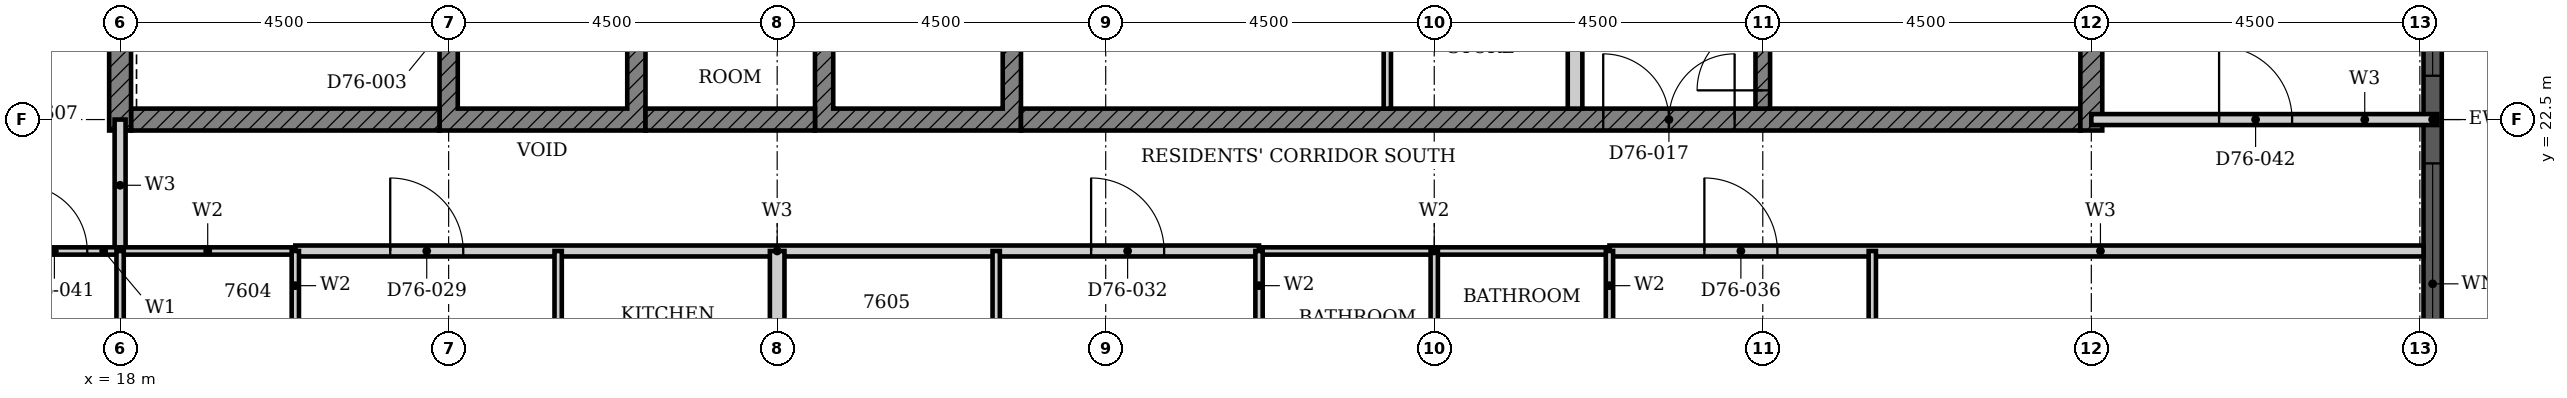
"""IFC4 building model, lengths in metres.
Left out: names, types, materials, properties, quantities, classifications, styles, units other than length and angle.
Written with IfcOpenShell. Run it as: python <this file> out.ifc"""

import sys

from ifc_helpers import new_model, si_unit, direction, frame, frame_2d, origin, place, context, subcontext, project, spatial, polyline, rectangle, outline, extrude, element, fill, save


model = new_model("IFC4")
c1 = context("Model", 3, precision=1e-05, world=origin(), true_north=direction((0.0, 1.0)))
c2 = subcontext(c1, "Body", "Model", "MODEL_VIEW")
j1 = project(units=[si_unit("LENGTHUNIT", "METRE"), si_unit("PLANEANGLEUNIT", "RADIAN")], contexts=[c1])
p1 = place(None, origin())
s1 = spatial("IfcSite", under=j1, at=p1, CompositionType="ELEMENT")
p2 = place(p1, origin())
s2 = spatial("IfcBuilding", under=s1, at=p2, CompositionType="ELEMENT")
p3 = place(p2, frame((0.0, 0.0, 298.2)))
s3 = spatial("IfcBuildingStorey", under=s2, at=p3, CompositionType="ELEMENT", Elevation=298.2)
p4 = place(p3, frame((49.675, 18.3, 0.0), z_axis=(0.0, 0.0, 1.0), x_axis=(0.0, 1.0, 0.0)))
e1 = element("IfcWall", 1, at=p4, inside=s3, PredefinedType="SOLIDWALL", context=c2, shape_type="SweptSolid", body=[
    extrude(rectangle(XDim=8.4, YDim=0.25, at=frame_2d((4.2, 0.0))), origin(), (0.0, 0.0, 1.0), 3.7),
])
p5 = place(p4, frame((0.3, 0.0, 0.45)))
e2 = element("IfcOpeningElement", 2, at=p5, cuts=e1, PredefinedType="OPENING", context=c2, shape_type="SweptSolid", body=[
    extrude(rectangle(XDim=3.3, YDim=2.3, at=frame_2d((1.65, 1.15))), frame((0.0, 0.135, 0.0), z_axis=(0.0, -1.0, 0.0), x_axis=(1.0, 0.0, 0.0)), (0.0, 0.0, 1.0), 0.27),
])
p6 = place(p4, frame((4.8, 0.0, 0.45)))
e3 = element("IfcOpeningElement", 3, at=p6, cuts=e1, PredefinedType="OPENING", context=c2, shape_type="SweptSolid", body=[
    extrude(rectangle(XDim=3.3, YDim=2.3, at=frame_2d((1.65, 1.15))), frame((0.0, 0.135, 0.0), z_axis=(0.0, -1.0, 0.0), x_axis=(1.0, 0.0, 0.0)), (0.0, 0.0, 1.0), 0.27),
])
p7 = place(p3, origin())
e4 = element("IfcWall", 4, at=p7, inside=s3, PredefinedType="SHEAR", context=c2, shape_type="SweptSolid", body=[
    extrude(outline(polyline([(22.375, 22.35), (25.197, 22.35), (25.197, 25.275), (24.947, 25.275), (24.947, 22.65), (22.625, 22.65), (22.625, 25.275), (22.375, 25.275), (22.375, 22.35)])), origin(), (0.0, 0.0, 1.0), 3.4),
])
p8 = place(p3, origin())
e5 = element("IfcWall", 5, at=p8, inside=s3, PredefinedType="SHEAR", context=c2, shape_type="SweptSolid", body=[
    extrude(outline(polyline([(27.518, 22.35), (30.339, 22.35), (30.339, 25.275), (30.089, 25.275), (30.089, 22.65), (27.768, 22.65), (27.768, 25.275), (27.518, 25.275), (27.518, 22.35)])), origin(), (0.0, 0.0, 1.0), 3.4),
])
p9 = place(p3, frame((18.15, 22.5, 0.0), z_axis=(0.0, 0.0, 1.0), x_axis=(1.0, 0.0, 0.0)))
e6 = element("IfcWall", 6, at=p9, inside=s3, PredefinedType="SHEAR", context=c2, shape_type="SweptSolid", body=[
    extrude(rectangle(XDim=4.225, YDim=0.3, at=frame_2d((2.113, 0.0))), origin(), (0.0, 0.0, 1.0), 3.4),
])
p10 = place(p3, frame((25.197, 22.5, 0.0), z_axis=(0.0, 0.0, 1.0), x_axis=(1.0, 0.0, 0.0)))
e7 = element("IfcWall", 7, at=p10, inside=s3, PredefinedType="SHEAR", context=c2, shape_type="SweptSolid", body=[
    extrude(rectangle(XDim=2.321, YDim=0.3, at=frame_2d((1.161, 0.0))), origin(), (0.0, 0.0, 1.0), 3.4),
])
p11 = place(p3, frame((30.339, 22.5, 0.0), z_axis=(0.0, 0.0, 1.0), x_axis=(1.0, 0.0, 0.0)))
e8 = element("IfcWall", 8, at=p11, inside=s3, PredefinedType="SHEAR", context=c2, shape_type="SweptSolid", body=[
    extrude(rectangle(XDim=14.511, YDim=0.3, at=frame_2d((7.255, 0.0))), origin(), (0.0, 0.0, 1.0), 3.4),
])
p12 = place(p11, frame((7.975, 0.0, 0.0)))
e9 = element("IfcOpeningElement", 9, at=p12, cuts=e8, PredefinedType="OPENING", context=c2, shape_type="SweptSolid", body=[
    extrude(rectangle(XDim=1.8, YDim=2.1, at=frame_2d((0.9, 1.05))), frame((0.0, 0.16, 0.0), z_axis=(0.0, -1.0, 0.0), x_axis=(1.0, 0.0, 0.0)), (0.0, 0.0, 1.0), 0.32),
])
for number, where, z_axis, x_axis in (
    (10, (18.0, 22.35, 0.0), (0.0, 0.0, 1.0), (0.0, 1.0, 0.0)),
    (11, (45.0, 22.35, 0.0), (0.0, 0.0, 1.0), (0.0, 1.0, 0.0)),
):
    element("IfcWall", number, at=place(p3, frame(where, z_axis=z_axis, x_axis=x_axis)), inside=s3, PredefinedType="SHEAR", context=c2, shape_type="SweptSolid", body=[
        extrude(rectangle(XDim=9.3, YDim=0.3, at=frame_2d((4.65, 0.0))), origin(), (0.0, 0.0, 1.0), 3.4),
    ])
p13 = place(p3, frame((37.928, 22.65, 0.0), z_axis=(0.0, 0.0, 1.0), x_axis=(0.0, 1.0, 0.0)))
e12 = element("IfcWall", 12, at=p13, inside=s3, PredefinedType="PARTITIONING", context=c2, shape_type="SweptSolid", body=[
    extrude(rectangle(XDim=2.625, YDim=0.2, at=frame_2d((1.312, 0.0))), origin(), (0.0, 0.0, 1.0), 3.4),
])
p14 = place(p3, frame((35.357, 22.65, 0.0), z_axis=(0.0, 0.0, 1.0), x_axis=(0.0, 1.0, 0.0)))
e13 = element("IfcWall", 13, at=p14, inside=s3, PredefinedType="PARTITIONING", context=c2, shape_type="SweptSolid", body=[
    extrude(rectangle(XDim=2.625, YDim=0.1, at=frame_2d((1.312, 0.0))), origin(), (0.0, 0.0, 1.0), 3.4),
])
p15 = place(p3, frame((40.5, 22.65, 0.0), z_axis=(0.0, 0.0, 1.0), x_axis=(0.0, 1.0, 0.0)))
e14 = element("IfcWall", 14, at=p15, inside=s3, PredefinedType="SHEAR", context=c2, shape_type="SweptSolid", body=[
    extrude(rectangle(XDim=5.825, YDim=0.2, at=frame_2d((2.913, 0.0))), origin(), (0.0, 0.0, 1.0), 3.4),
])
p16 = place(p15, frame((0.25, 0.0, 0.0)))
e15 = element("IfcOpeningElement", 15, at=p16, cuts=e14, PredefinedType="OPENING", context=c2, shape_type="SweptSolid", body=[
    extrude(rectangle(XDim=1.8, YDim=2.1, at=frame_2d((0.9, 1.05))), frame((0.0, 0.11, 0.0), z_axis=(0.0, -1.0, 0.0), x_axis=(1.0, 0.0, 0.0)), (0.0, 0.0, 1.0), 0.22),
])
p17 = place(p3, frame((20.4, 20.7, 0.0), z_axis=(0.0, 0.0, 1.0), x_axis=(1.0, 0.0, 0.0)))
e16 = element("IfcWall", 16, at=p17, inside=s3, PredefinedType="PARTITIONING", context=c2, shape_type="SweptSolid", body=[
    extrude(rectangle(XDim=13.2, YDim=0.15, at=frame_2d((6.6, 0.0))), origin(), (0.0, 0.0, 1.0), 3.4),
])
p18 = place(p17, frame((1.3, 0.0, 0.0)))
e17 = element("IfcOpeningElement", 17, at=p18, cuts=e16, PredefinedType="OPENING", context=c2, shape_type="SweptSolid", body=[
    extrude(rectangle(XDim=1.0, YDim=2.2, at=frame_2d((0.5, 1.1))), frame((0.0, 0.085, 0.0), z_axis=(0.0, -1.0, 0.0), x_axis=(1.0, 0.0, 0.0)), (0.0, 0.0, 1.0), 0.17),
])
p19 = place(p17, frame((10.9, 0.0, 0.0)))
e18 = element("IfcOpeningElement", 18, at=p19, cuts=e16, PredefinedType="OPENING", context=c2, shape_type="SweptSolid", body=[
    extrude(rectangle(XDim=1.0, YDim=2.2, at=frame_2d((0.5, 1.1))), frame((0.0, 0.085, 0.0), z_axis=(0.0, -1.0, 0.0), x_axis=(1.0, 0.0, 0.0)), (0.0, 0.0, 1.0), 0.17),
])
p20 = place(p3, frame((38.4, 20.7, 0.0), z_axis=(0.0, 0.0, 1.0), x_axis=(1.0, 0.0, 0.0)))
e19 = element("IfcWall", 19, at=p20, inside=s3, PredefinedType="PARTITIONING", context=c2, shape_type="SweptSolid", body=[
    extrude(rectangle(XDim=11.15, YDim=0.15, at=frame_2d((5.575, 0.0))), origin(), (0.0, 0.0, 1.0), 3.4),
])
p21 = place(p20, frame((1.3, 0.0, 0.0)))
e20 = element("IfcOpeningElement", 20, at=p21, cuts=e19, PredefinedType="OPENING", context=c2, shape_type="SweptSolid", body=[
    extrude(rectangle(XDim=1.0, YDim=2.2, at=frame_2d((0.5, 1.1))), frame((0.0, 0.085, 0.0), z_axis=(0.0, -1.0, 0.0), x_axis=(1.0, 0.0, 0.0)), (0.0, 0.0, 1.0), 0.17),
])
p22 = place(p3, frame((45.0, 22.5, 0.0), z_axis=(0.0, 0.0, 1.0), x_axis=(1.0, 0.0, 0.0)))
e21 = element("IfcWall", 21, at=p22, inside=s3, PredefinedType="PARTITIONING", context=c2, shape_type="SweptSolid", body=[
    extrude(rectangle(XDim=4.74, YDim=0.15, at=frame_2d((2.37, 0.0))), origin(), (0.0, 0.0, 1.0), 3.4),
])
p23 = place(p22, frame((1.75, 0.0, 0.0)))
e22 = element("IfcOpeningElement", 22, at=p23, cuts=e21, PredefinedType="OPENING", context=c2, shape_type="SweptSolid", body=[
    extrude(rectangle(XDim=1.0, YDim=2.2, at=frame_2d((0.5, 1.1))), frame((0.0, 0.085, 0.0), z_axis=(0.0, -1.0, 0.0), x_axis=(1.0, 0.0, 0.0)), (0.0, 0.0, 1.0), 0.17),
])
p24 = place(p3, frame((18.0, 20.7, 0.0), z_axis=(0.0, 0.0, 1.0), x_axis=(0.0, 1.0, 0.0)))
e23 = element("IfcWall", 23, at=p24, inside=s3, PredefinedType="PARTITIONING", context=c2, shape_type="SweptSolid", body=[
    extrude(rectangle(XDim=1.8, YDim=0.15, at=frame_2d((0.9, 0.0))), origin(), (0.0, 0.0, 1.0), 3.4),
])
p25 = place(p3, frame((16.2, 20.7, 0.0), z_axis=(0.0, 0.0, 1.0), x_axis=(1.0, 0.0, 0.0)))
e24 = element("IfcWall", 24, at=p25, inside=s3, PredefinedType="PARTITIONING", context=c2, shape_type="SweptSolid", body=[
    extrude(rectangle(XDim=1.8, YDim=0.1, at=frame_2d((0.9, 0.0))), origin(), (0.0, 0.0, 1.0), 3.4),
])
p26 = place(p25, frame((0.45, 0.0, 0.0)))
e25 = element("IfcOpeningElement", 25, at=p26, cuts=e24, PredefinedType="OPENING", context=c2, shape_type="SweptSolid", body=[
    extrude(rectangle(XDim=0.9, YDim=2.1, at=frame_2d((0.45, 1.05))), frame((0.0, 0.06, 0.0), z_axis=(0.0, -1.0, 0.0), x_axis=(1.0, 0.0, 0.0)), (0.0, 0.0, 1.0), 0.12),
])
for number, where, z_axis, x_axis in (
    (26, (24.0, 18.0, 0.0), (0.0, 0.0, 1.0), (0.0, 1.0, 0.0)),
    (27, (30.0, 18.0, 0.0), (0.0, 0.0, 1.0), (0.0, 1.0, 0.0)),
    (28, (42.0, 18.0, 0.0), (0.0, 0.0, 1.0), (0.0, 1.0, 0.0)),
):
    element("IfcWall", number, at=place(p3, frame(where, z_axis=z_axis, x_axis=x_axis)), inside=s3, PredefinedType="PARTITIONING", context=c2, shape_type="SweptSolid", body=[
        extrude(rectangle(XDim=2.7, YDim=0.1, at=frame_2d((1.35, 0.0))), origin(), (0.0, 0.0, 1.0), 3.4),
    ])
p27 = place(p3, frame((27.0, 13.31, 0.0), z_axis=(0.0, 0.0, 1.0), x_axis=(0.0, 1.0, 0.0)))
e29 = element("IfcWall", 29, at=p27, inside=s3, PredefinedType="PARTITIONING", context=c2, shape_type="SweptSolid", body=[
    extrude(rectangle(XDim=7.39, YDim=0.2, at=frame_2d((3.695, 0.0))), origin(), (0.0, 0.0, 1.0), 3.4),
])
p28 = place(p3, frame((18.0, 20.7, 0.0), z_axis=(0.0, 0.0, 1.0), x_axis=(1.0, 0.0, 0.0)))
e30 = element("IfcWall", 30, at=p28, inside=s3, PredefinedType="PARTITIONING", context=c2, shape_type="SweptSolid", body=[
    extrude(rectangle(XDim=2.4, YDim=0.1, at=frame_2d((1.2, 0.0))), origin(), (0.0, 0.0, 1.0), 3.4),
])
p29 = place(p3, frame((33.6, 20.7, 0.0), z_axis=(0.0, 0.0, 1.0), x_axis=(1.0, 0.0, 0.0)))
e31 = element("IfcWall", 31, at=p29, inside=s3, PredefinedType="PARTITIONING", context=c2, shape_type="SweptSolid", body=[
    extrude(rectangle(XDim=4.8, YDim=0.1, at=frame_2d((2.4, 0.0))), origin(), (0.0, 0.0, 1.0), 3.4),
])
p30 = place(p3, frame((18.0, 18.0, 0.0), z_axis=(0.0, 0.0, 1.0), x_axis=(0.0, 1.0, 0.0)))
e32 = element("IfcWall", 32, at=p30, inside=s3, PredefinedType="PARTITIONING", context=c2, shape_type="SweptSolid", body=[
    extrude(rectangle(XDim=2.7, YDim=0.1, at=frame_2d((1.35, 0.0))), origin(), (0.0, 0.0, 1.0), 3.4),
])
p31 = place(p3, frame((20.4, 18.0, 0.0), z_axis=(0.0, 0.0, 1.0), x_axis=(0.0, 1.0, 0.0)))
e33 = element("IfcWall", 33, at=p31, inside=s3, PredefinedType="PARTITIONING", context=c2, shape_type="SweptSolid", body=[
    extrude(rectangle(XDim=2.7, YDim=0.1, at=frame_2d((1.35, 0.0))), origin(), (0.0, 0.0, 1.0), 3.4),
])
p32 = place(p31, frame((0.95, 0.0, 0.0)))
e34 = element("IfcOpeningElement", 34, at=p32, cuts=e33, PredefinedType="OPENING", context=c2, shape_type="SweptSolid", body=[
    extrude(rectangle(XDim=0.8, YDim=2.1, at=frame_2d((0.4, 1.05))), frame((0.0, 0.06, 0.0), z_axis=(0.0, -1.0, 0.0), x_axis=(1.0, 0.0, 0.0)), (0.0, 0.0, 1.0), 0.12),
])
p33 = place(p3, frame((33.6, 18.0, 0.0), z_axis=(0.0, 0.0, 1.0), x_axis=(0.0, 1.0, 0.0)))
e35 = element("IfcWall", 35, at=p33, inside=s3, PredefinedType="PARTITIONING", context=c2, shape_type="SweptSolid", body=[
    extrude(rectangle(XDim=2.7, YDim=0.1, at=frame_2d((1.35, 0.0))), origin(), (0.0, 0.0, 1.0), 3.4),
])
p34 = place(p33, frame((0.95, 0.0, 0.0)))
e36 = element("IfcOpeningElement", 36, at=p34, cuts=e35, PredefinedType="OPENING", context=c2, shape_type="SweptSolid", body=[
    extrude(rectangle(XDim=0.8, YDim=2.1, at=frame_2d((0.4, 1.05))), frame((0.0, 0.06, 0.0), z_axis=(0.0, -1.0, 0.0), x_axis=(1.0, 0.0, 0.0)), (0.0, 0.0, 1.0), 0.12),
])
p35 = place(p3, frame((36.0, 18.0, 0.0), z_axis=(0.0, 0.0, 1.0), x_axis=(0.0, 1.0, 0.0)))
e37 = element("IfcWall", 37, at=p35, inside=s3, PredefinedType="PARTITIONING", context=c2, shape_type="SweptSolid", body=[
    extrude(rectangle(XDim=2.7, YDim=0.1, at=frame_2d((1.35, 0.0))), origin(), (0.0, 0.0, 1.0), 3.4),
])
p36 = place(p3, frame((38.4, 18.0, 0.0), z_axis=(0.0, 0.0, 1.0), x_axis=(0.0, 1.0, 0.0)))
e38 = element("IfcWall", 38, at=p36, inside=s3, PredefinedType="PARTITIONING", context=c2, shape_type="SweptSolid", body=[
    extrude(rectangle(XDim=2.7, YDim=0.1, at=frame_2d((1.35, 0.0))), origin(), (0.0, 0.0, 1.0), 3.4),
])
p37 = place(p36, frame((0.95, 0.0, 0.0)))
e39 = element("IfcOpeningElement", 39, at=p37, cuts=e38, PredefinedType="OPENING", context=c2, shape_type="SweptSolid", body=[
    extrude(rectangle(XDim=0.8, YDim=2.1, at=frame_2d((0.4, 1.05))), frame((0.0, 0.06, 0.0), z_axis=(0.0, -1.0, 0.0), x_axis=(1.0, 0.0, 0.0)), (0.0, 0.0, 1.0), 0.12),
])
p38 = place(p5, origin())
e40 = element("IfcWindow", 40, at=p38, inside=s3, PartitioningType="SINGLE_PANEL", PredefinedType="WINDOW", context=c2, shape_type="SweptSolid", body=[
    extrude(rectangle(XDim=3.3, YDim=2.3, at=frame_2d((1.65, 1.15))), frame((0.0, 0.03, 0.0), z_axis=(0.0, -1.0, 0.0), x_axis=(1.0, 0.0, 0.0)), (0.0, 0.0, 1.0), 0.06),
])
fill(e2, e40)
p39 = place(p6, origin())
e41 = element("IfcWindow", 41, at=p39, inside=s3, PartitioningType="SINGLE_PANEL", PredefinedType="WINDOW", context=c2, shape_type="SweptSolid", body=[
    extrude(rectangle(XDim=3.3, YDim=2.3, at=frame_2d((1.65, 1.15))), frame((0.0, 0.03, 0.0), z_axis=(0.0, -1.0, 0.0), x_axis=(1.0, 0.0, 0.0)), (0.0, 0.0, 1.0), 0.06),
])
fill(e3, e41)
p40 = place(p16, origin())
e42 = element("IfcDoor", 42, at=p40, inside=s3, OperationType="DOUBLE_DOOR_SINGLE_SWING", PredefinedType="DOOR", context=c2, shape_type="SweptSolid", body=[
    extrude(rectangle(XDim=1.8, YDim=2.1, at=frame_2d((0.9, 1.05))), frame((0.0, 0.025, 0.0), z_axis=(0.0, -1.0, 0.0), x_axis=(1.0, 0.0, 0.0)), (0.0, 0.0, 1.0), 0.05),
])
fill(e15, e42)
p41 = place(p12, origin())
e43 = element("IfcDoor", 43, at=p41, inside=s3, OperationType="DOUBLE_DOOR_SINGLE_SWING", PredefinedType="DOOR", context=c2, shape_type="SweptSolid", body=[
    extrude(rectangle(XDim=1.8, YDim=2.1, at=frame_2d((0.9, 1.05))), frame((0.0, 0.025, 0.0), z_axis=(0.0, -1.0, 0.0), x_axis=(1.0, 0.0, 0.0)), (0.0, 0.0, 1.0), 0.05),
])
fill(e9, e43)
p42 = place(p18, origin())
e44 = element("IfcDoor", 44, at=p42, inside=s3, OperationType="SINGLE_SWING_RIGHT", PredefinedType="DOOR", context=c2, shape_type="SweptSolid", body=[
    extrude(rectangle(XDim=1.0, YDim=2.2, at=frame_2d((0.5, 1.1))), frame((0.0, 0.025, 0.0), z_axis=(0.0, -1.0, 0.0), x_axis=(1.0, 0.0, 0.0)), (0.0, 0.0, 1.0), 0.05),
])
fill(e17, e44)
p43 = place(p19, origin())
e45 = element("IfcDoor", 45, at=p43, inside=s3, OperationType="SINGLE_SWING_LEFT", PredefinedType="DOOR", context=c2, shape_type="SweptSolid", body=[
    extrude(rectangle(XDim=1.0, YDim=2.2, at=frame_2d((0.5, 1.1))), frame((0.0, 0.025, 0.0), z_axis=(0.0, -1.0, 0.0), x_axis=(1.0, 0.0, 0.0)), (0.0, 0.0, 1.0), 0.05),
])
fill(e18, e45)
p44 = place(p21, origin())
e46 = element("IfcDoor", 46, at=p44, inside=s3, OperationType="SINGLE_SWING_LEFT", PredefinedType="DOOR", context=c2, shape_type="SweptSolid", body=[
    extrude(rectangle(XDim=1.0, YDim=2.2, at=frame_2d((0.5, 1.1))), frame((0.0, 0.025, 0.0), z_axis=(0.0, -1.0, 0.0), x_axis=(1.0, 0.0, 0.0)), (0.0, 0.0, 1.0), 0.05),
])
fill(e20, e46)
p45 = place(p26, origin())
e47 = element("IfcDoor", 47, at=p45, inside=s3, OperationType="SINGLE_SWING_LEFT", PredefinedType="DOOR", context=c2, shape_type="SweptSolid", body=[
    extrude(rectangle(XDim=0.9, YDim=2.1, at=frame_2d((0.45, 1.05))), frame((0.0, 0.025, 0.0), z_axis=(0.0, -1.0, 0.0), x_axis=(1.0, 0.0, 0.0)), (0.0, 0.0, 1.0), 0.05),
])
fill(e25, e47)
p46 = place(p23, origin())
e48 = element("IfcDoor", 48, at=p46, inside=s3, OperationType="SINGLE_SWING_RIGHT", PredefinedType="DOOR", context=c2, shape_type="SweptSolid", body=[
    extrude(rectangle(XDim=1.0, YDim=2.2, at=frame_2d((0.5, 1.1))), frame((0.0, 0.025, 0.0), z_axis=(0.0, -1.0, 0.0), x_axis=(1.0, 0.0, 0.0)), (0.0, 0.0, 1.0), 0.05),
])
fill(e22, e48)
save(model, sys.argv[1])
